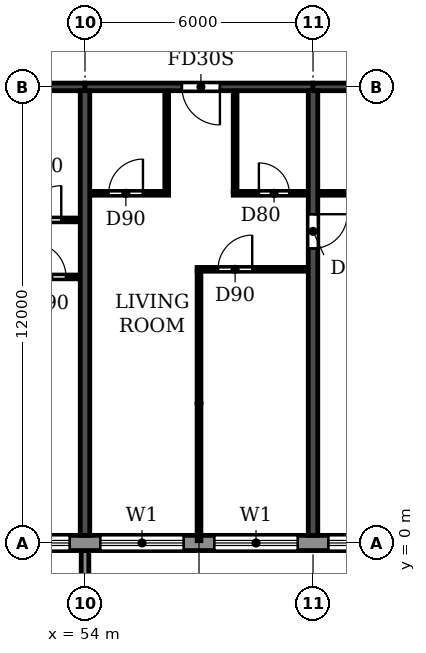
"""IFC4 building model, lengths in metres.
Left out: names, types, materials, properties, quantities, classifications, styles, units other than length and angle.
Written with IfcOpenShell. Run it as: python <this file> out.ifc"""

import sys

from ifc_helpers import new_model, si_unit, direction, frame, frame_2d, origin, place, context, subcontext, project, spatial, polyline, rectangle, outline, extrude, source, transform, mapped, element, fill, save


model = new_model("IFC4")
c1 = context("Model", 3, precision=1e-05, world=origin(), true_north=direction((0.0, 1.0)))
c2 = subcontext(c1, "Body", "Model", "MODEL_VIEW")
j1 = project(units=[si_unit("LENGTHUNIT", "METRE"), si_unit("PLANEANGLEUNIT", "RADIAN")], contexts=[c1])
p1 = place(None, origin())
s1 = spatial("IfcSite", under=j1, at=p1, CompositionType="ELEMENT")
p2 = place(p1, origin())
s2 = spatial("IfcBuilding", under=s1, at=p2, CompositionType="ELEMENT")
p3 = place(p2, frame((0.0, 0.0, 201.6)))
s3 = spatial("IfcBuildingStorey", under=s2, at=p3, CompositionType="ELEMENT", Elevation=201.6)
p4 = place(p3, frame((54.0, 0.2, 0.0), z_axis=(0.0, 0.0, 1.0), x_axis=(0.0, 1.0, 0.0)))
e1 = element("IfcWall", 1, at=p4, inside=s3, PredefinedType="SHEAR", context=c2, shape_type="SweptSolid", body=[
    extrude(rectangle(XDim=11.7, YDim=0.25, at=frame_2d((5.85, 0.0))), origin(), (0.0, 0.0, 1.0), 3.08),
])
p5 = place(p3, frame((60.0, 0.2, 0.0), z_axis=(0.0, 0.0, 1.0), x_axis=(0.0, 1.0, 0.0)))
e2 = element("IfcWall", 2, at=p5, inside=s3, PredefinedType="SHEAR", context=c2, shape_type="SweptSolid", body=[
    extrude(rectangle(XDim=11.7, YDim=0.25, at=frame_2d((5.85, 0.0))), origin(), (0.0, 0.0, 1.0), 3.08),
])
p6 = place(p5, frame((7.55, 0.0, 0.0)))
e3 = element("IfcOpeningElement", 3, at=p6, cuts=e2, PredefinedType="OPENING", context=c2, shape_type="SweptSolid", body=[
    extrude(rectangle(XDim=0.9, YDim=2.1, at=frame_2d((0.45, 1.05))), frame((0.0, 0.135, 0.0), z_axis=(0.0, -1.0, 0.0), x_axis=(1.0, 0.0, 0.0)), (0.0, 0.0, 1.0), 0.27),
])
p7 = place(p3, frame((48.0, 12.0, 0.0), z_axis=(0.0, 0.0, 1.0), x_axis=(1.0, 0.0, 0.0)))
e4 = element("IfcWall", 4, at=p7, inside=s3, PredefinedType="SHEAR", context=c2, shape_type="SweptSolid", body=[
    extrude(rectangle(XDim=6.0, YDim=0.2, at=frame_2d((3.0, 0.0))), origin(), (0.0, 0.0, 1.0), 2.48),
])
p8 = place(p7, frame((2.45, 0.0, 0.0)))
e5 = element("IfcOpeningElement", 5, at=p8, cuts=e4, PredefinedType="OPENING", context=c2, shape_type="SweptSolid", body=[
    extrude(rectangle(XDim=1.0, YDim=2.1, at=frame_2d((0.5, 1.05))), frame((0.0, 0.11, 0.0), z_axis=(0.0, -1.0, 0.0), x_axis=(1.0, 0.0, 0.0)), (0.0, 0.0, 1.0), 0.22),
])
p9 = place(p3, frame((54.0, 12.0, 0.0), z_axis=(0.0, 0.0, 1.0), x_axis=(1.0, 0.0, 0.0)))
e6 = element("IfcWall", 6, at=p9, inside=s3, PredefinedType="SHEAR", context=c2, shape_type="SweptSolid", body=[
    extrude(rectangle(XDim=6.0, YDim=0.2, at=frame_2d((3.0, 0.0))), origin(), (0.0, 0.0, 1.0), 2.48),
])
p10 = place(p9, frame((2.55, 0.0, 0.0)))
e7 = element("IfcOpeningElement", 7, at=p10, cuts=e6, PredefinedType="OPENING", context=c2, shape_type="SweptSolid", body=[
    extrude(rectangle(XDim=1.0, YDim=2.1, at=frame_2d((0.5, 1.05))), frame((0.0, 0.11, 0.0), z_axis=(0.0, -1.0, 0.0), x_axis=(1.0, 0.0, 0.0)), (0.0, 0.0, 1.0), 0.22),
])
p11 = place(p3, frame((60.0, 12.0, 0.0), z_axis=(0.0, 0.0, 1.0), x_axis=(1.0, 0.0, 0.0)))
e8 = element("IfcWall", 8, at=p11, inside=s3, PredefinedType="SHEAR", context=c2, shape_type="SweptSolid", body=[
    extrude(rectangle(XDim=6.0, YDim=0.2, at=frame_2d((3.0, 0.0))), origin(), (0.0, 0.0, 1.0), 2.48),
])
p12 = place(p3, frame((22.683, 0.0, 0.0), z_axis=(0.0, 0.0, 1.0), x_axis=(1.0, 0.0, 0.0)))
e9 = element("IfcWall", 9, at=p12, inside=s3, PredefinedType="STANDARD", context=c2, shape_type="SweptSolid", body=[
    extrude(rectangle(XDim=56.634, YDim=0.4, at=frame_2d((28.317, 0.0))), origin(), (0.0, 0.0, 1.0), 3.08),
])
p13 = place(p12, frame((1.917, 0.0, 0.0)))
e10 = element("IfcOpeningElement", 10, at=p13, cuts=e9, PredefinedType="OPENING", context=c2, shape_type="SweptSolid", body=[
    extrude(rectangle(XDim=1.8, YDim=2.4, at=frame_2d((0.9, 1.2))), frame((0.0, 0.21, 0.0), z_axis=(0.0, -1.0, 0.0), x_axis=(1.0, 0.0, 0.0)), (0.0, 0.0, 1.0), 0.42),
])
p14 = place(p12, frame((4.717, 0.0, 0.9)))
e11 = element("IfcOpeningElement", 11, at=p14, cuts=e9, PredefinedType="OPENING", context=c2, shape_type="SweptSolid", body=[
    extrude(rectangle(XDim=2.2, YDim=1.5, at=frame_2d((1.1, 0.75))), frame((0.0, 0.21, 0.0), z_axis=(0.0, -1.0, 0.0), x_axis=(1.0, 0.0, 0.0)), (0.0, 0.0, 1.0), 0.42),
])
p15 = place(p12, frame((7.717, 0.0, 0.9)))
e12 = element("IfcOpeningElement", 12, at=p15, cuts=e9, PredefinedType="OPENING", context=c2, shape_type="SweptSolid", body=[
    extrude(rectangle(XDim=2.2, YDim=1.5, at=frame_2d((1.1, 0.75))), frame((0.0, 0.21, 0.0), z_axis=(0.0, -1.0, 0.0), x_axis=(1.0, 0.0, 0.0)), (0.0, 0.0, 1.0), 0.42),
])
p16 = place(p12, frame((10.717, 0.0, 0.9)))
e13 = element("IfcOpeningElement", 13, at=p16, cuts=e9, PredefinedType="OPENING", context=c2, shape_type="SweptSolid", body=[
    extrude(rectangle(XDim=2.2, YDim=1.5, at=frame_2d((1.1, 0.75))), frame((0.0, 0.21, 0.0), z_axis=(0.0, -1.0, 0.0), x_axis=(1.0, 0.0, 0.0)), (0.0, 0.0, 1.0), 0.42),
])
p17 = place(p12, frame((13.917, 0.0, 0.0)))
e14 = element("IfcOpeningElement", 14, at=p17, cuts=e9, PredefinedType="OPENING", context=c2, shape_type="SweptSolid", body=[
    extrude(rectangle(XDim=1.8, YDim=2.4, at=frame_2d((0.9, 1.2))), frame((0.0, 0.21, 0.0), z_axis=(0.0, -1.0, 0.0), x_axis=(1.0, 0.0, 0.0)), (0.0, 0.0, 1.0), 0.42),
])
p18 = place(p12, frame((16.717, 0.0, 0.9)))
e15 = element("IfcOpeningElement", 15, at=p18, cuts=e9, PredefinedType="OPENING", context=c2, shape_type="SweptSolid", body=[
    extrude(rectangle(XDim=2.2, YDim=1.5, at=frame_2d((1.1, 0.75))), frame((0.0, 0.21, 0.0), z_axis=(0.0, -1.0, 0.0), x_axis=(1.0, 0.0, 0.0)), (0.0, 0.0, 1.0), 0.42),
])
p19 = place(p12, frame((19.717, 0.0, 0.9)))
e16 = element("IfcOpeningElement", 16, at=p19, cuts=e9, PredefinedType="OPENING", context=c2, shape_type="SweptSolid", body=[
    extrude(rectangle(XDim=2.2, YDim=1.5, at=frame_2d((1.1, 0.75))), frame((0.0, 0.21, 0.0), z_axis=(0.0, -1.0, 0.0), x_axis=(1.0, 0.0, 0.0)), (0.0, 0.0, 1.0), 0.42),
])
p20 = place(p12, frame((22.717, 0.0, 0.9)))
e17 = element("IfcOpeningElement", 17, at=p20, cuts=e9, PredefinedType="OPENING", context=c2, shape_type="SweptSolid", body=[
    extrude(rectangle(XDim=2.2, YDim=1.5, at=frame_2d((1.1, 0.75))), frame((0.0, 0.21, 0.0), z_axis=(0.0, -1.0, 0.0), x_axis=(1.0, 0.0, 0.0)), (0.0, 0.0, 1.0), 0.42),
])
p21 = place(p12, frame((25.917, 0.0, 0.0)))
e18 = element("IfcOpeningElement", 18, at=p21, cuts=e9, PredefinedType="OPENING", context=c2, shape_type="SweptSolid", body=[
    extrude(rectangle(XDim=1.8, YDim=2.4, at=frame_2d((0.9, 1.2))), frame((0.0, 0.21, 0.0), z_axis=(0.0, -1.0, 0.0), x_axis=(1.0, 0.0, 0.0)), (0.0, 0.0, 1.0), 0.42),
])
p22 = place(p12, frame((28.717, 0.0, 0.9)))
e19 = element("IfcOpeningElement", 19, at=p22, cuts=e9, PredefinedType="OPENING", context=c2, shape_type="SweptSolid", body=[
    extrude(rectangle(XDim=2.2, YDim=1.5, at=frame_2d((1.1, 0.75))), frame((0.0, 0.21, 0.0), z_axis=(0.0, -1.0, 0.0), x_axis=(1.0, 0.0, 0.0)), (0.0, 0.0, 1.0), 0.42),
])
p23 = place(p12, frame((31.717, 0.0, 0.9)))
e20 = element("IfcOpeningElement", 20, at=p23, cuts=e9, PredefinedType="OPENING", context=c2, shape_type="SweptSolid", body=[
    extrude(rectangle(XDim=2.2, YDim=1.5, at=frame_2d((1.1, 0.75))), frame((0.0, 0.21, 0.0), z_axis=(0.0, -1.0, 0.0), x_axis=(1.0, 0.0, 0.0)), (0.0, 0.0, 1.0), 0.42),
])
p24 = place(p12, frame((34.717, 0.0, 0.9)))
e21 = element("IfcOpeningElement", 21, at=p24, cuts=e9, PredefinedType="OPENING", context=c2, shape_type="SweptSolid", body=[
    extrude(rectangle(XDim=2.2, YDim=1.5, at=frame_2d((1.1, 0.75))), frame((0.0, 0.21, 0.0), z_axis=(0.0, -1.0, 0.0), x_axis=(1.0, 0.0, 0.0)), (0.0, 0.0, 1.0), 0.42),
])
p25 = place(p12, frame((37.717, 0.0, 0.9)))
e22 = element("IfcOpeningElement", 22, at=p25, cuts=e9, PredefinedType="OPENING", context=c2, shape_type="SweptSolid", body=[
    extrude(rectangle(XDim=2.2, YDim=1.5, at=frame_2d((1.1, 0.75))), frame((0.0, 0.21, 0.0), z_axis=(0.0, -1.0, 0.0), x_axis=(1.0, 0.0, 0.0)), (0.0, 0.0, 1.0), 0.42),
])
p26 = place(p12, frame((40.717, 0.0, 0.9)))
e23 = element("IfcOpeningElement", 23, at=p26, cuts=e9, PredefinedType="OPENING", context=c2, shape_type="SweptSolid", body=[
    extrude(rectangle(XDim=2.2, YDim=1.5, at=frame_2d((1.1, 0.75))), frame((0.0, 0.21, 0.0), z_axis=(0.0, -1.0, 0.0), x_axis=(1.0, 0.0, 0.0)), (0.0, 0.0, 1.0), 0.42),
])
p27 = place(p12, frame((43.717, 0.0, 0.9)))
e24 = element("IfcOpeningElement", 24, at=p27, cuts=e9, PredefinedType="OPENING", context=c2, shape_type="SweptSolid", body=[
    extrude(rectangle(XDim=2.2, YDim=1.5, at=frame_2d((1.1, 0.75))), frame((0.0, 0.21, 0.0), z_axis=(0.0, -1.0, 0.0), x_axis=(1.0, 0.0, 0.0)), (0.0, 0.0, 1.0), 0.42),
])
p28 = place(p12, frame((46.717, 0.0, 0.9)))
e25 = element("IfcOpeningElement", 25, at=p28, cuts=e9, PredefinedType="OPENING", context=c2, shape_type="SweptSolid", body=[
    extrude(rectangle(XDim=2.2, YDim=1.5, at=frame_2d((1.1, 0.75))), frame((0.0, 0.21, 0.0), z_axis=(0.0, -1.0, 0.0), x_axis=(1.0, 0.0, 0.0)), (0.0, 0.0, 1.0), 0.42),
])
p29 = place(p12, frame((49.717, 0.0, 0.9)))
e26 = element("IfcOpeningElement", 26, at=p29, cuts=e9, PredefinedType="OPENING", context=c2, shape_type="SweptSolid", body=[
    extrude(rectangle(XDim=2.2, YDim=1.5, at=frame_2d((1.1, 0.75))), frame((0.0, 0.21, 0.0), z_axis=(0.0, -1.0, 0.0), x_axis=(1.0, 0.0, 0.0)), (0.0, 0.0, 1.0), 0.42),
])
p30 = place(p12, frame((52.917, 0.0, 0.0)))
e27 = element("IfcOpeningElement", 27, at=p30, cuts=e9, PredefinedType="OPENING", context=c2, shape_type="SweptSolid", body=[
    extrude(rectangle(XDim=1.8, YDim=2.4, at=frame_2d((0.9, 1.2))), frame((0.0, 0.21, 0.0), z_axis=(0.0, -1.0, 0.0), x_axis=(1.0, 0.0, 0.0)), (0.0, 0.0, 1.0), 0.42),
])
m1 = source(origin(), c2, "Body", "SweptSolid", [
    extrude(outline(polyline([(0.0, 0.0), (0.2, 0.0), (0.2, 1.65), (0.0, 1.65), (0.0, 0.0)])), origin(), (0.0, 0.0, 1.0), 3.1),
])
p31 = place(p3, frame((53.9, -1.85, 0.0)))
e28 = element("IfcWall", 28, at=p31, inside=s3, PredefinedType="STANDARD", context=c2, shape_type="MappedRepresentation", body=[
    mapped(m1, transform((0.0, 0.0, 0.0))),
])
p32 = place(p3, frame((50.95, 7.0, 0.0), z_axis=(0.0, 0.0, 1.0), x_axis=(1.0, 0.0, 0.0)))
e29 = element("IfcWall", 29, at=p32, inside=s3, PredefinedType="PARTITIONING", context=c2, shape_type="SweptSolid", body=[
    extrude(rectangle(XDim=2.915, YDim=0.1, at=frame_2d((1.458, 0.0))), origin(), (0.0, 0.0, 1.0), 3.08),
])
p33 = place(p32, frame((1.65, 0.0, 0.0)))
e30 = element("IfcOpeningElement", 30, at=p33, cuts=e29, PredefinedType="OPENING", context=c2, shape_type="SweptSolid", body=[
    extrude(rectangle(XDim=0.9, YDim=2.1, at=frame_2d((0.45, 1.05))), frame((0.0, 0.06, 0.0), z_axis=(0.0, -1.0, 0.0), x_axis=(1.0, 0.0, 0.0)), (0.0, 0.0, 1.0), 0.12),
])
p34 = place(p3, frame((56.95, 7.2, 0.0), z_axis=(0.0, 0.0, 1.0), x_axis=(1.0, 0.0, 0.0)))
e31 = element("IfcWall", 31, at=p34, inside=s3, PredefinedType="PARTITIONING", context=c2, shape_type="SweptSolid", body=[
    extrude(rectangle(XDim=2.915, YDim=0.1, at=frame_2d((1.458, 0.0))), origin(), (0.0, 0.0, 1.0), 3.08),
])
p35 = place(p34, frame((0.55, 0.0, 0.0)))
e32 = element("IfcOpeningElement", 32, at=p35, cuts=e31, PredefinedType="OPENING", context=c2, shape_type="SweptSolid", body=[
    extrude(rectangle(XDim=0.9, YDim=2.1, at=frame_2d((0.45, 1.05))), frame((0.0, 0.06, 0.0), z_axis=(0.0, -1.0, 0.0), x_axis=(1.0, 0.0, 0.0)), (0.0, 0.0, 1.0), 0.12),
])
p36 = place(p3, frame((51.8, 8.5, 0.0), z_axis=(0.0, 0.0, 1.0), x_axis=(1.0, 0.0, 0.0)))
e33 = element("IfcWall", 33, at=p36, inside=s3, PredefinedType="PARTITIONING", context=c2, shape_type="SweptSolid", body=[
    extrude(rectangle(XDim=2.065, YDim=0.1, at=frame_2d((1.032, 0.0))), origin(), (0.0, 0.0, 1.0), 3.08),
])
p37 = place(p36, frame((0.675, 0.0, 0.0)))
e34 = element("IfcOpeningElement", 34, at=p37, cuts=e33, PredefinedType="OPENING", context=c2, shape_type="SweptSolid", body=[
    extrude(rectangle(XDim=0.9, YDim=2.1, at=frame_2d((0.45, 1.05))), frame((0.0, 0.06, 0.0), z_axis=(0.0, -1.0, 0.0), x_axis=(1.0, 0.0, 0.0)), (0.0, 0.0, 1.0), 0.12),
])
p38 = place(p3, frame((54.135, 9.2, 0.0), z_axis=(0.0, 0.0, 1.0), x_axis=(1.0, 0.0, 0.0)))
e35 = element("IfcWall", 35, at=p38, inside=s3, PredefinedType="PARTITIONING", context=c2, shape_type="SweptSolid", body=[
    extrude(rectangle(XDim=2.065, YDim=0.1, at=frame_2d((1.032, 0.0))), origin(), (0.0, 0.0, 1.0), 3.08),
])
p39 = place(p38, frame((0.49, 0.0, 0.0)))
e36 = element("IfcOpeningElement", 36, at=p39, cuts=e35, PredefinedType="OPENING", context=c2, shape_type="SweptSolid", body=[
    extrude(rectangle(XDim=0.9, YDim=2.1, at=frame_2d((0.45, 1.05))), frame((0.0, 0.06, 0.0), z_axis=(0.0, -1.0, 0.0), x_axis=(1.0, 0.0, 0.0)), (0.0, 0.0, 1.0), 0.12),
])
p40 = place(p3, frame((57.9, 9.2, 0.0), z_axis=(0.0, 0.0, 1.0), x_axis=(1.0, 0.0, 0.0)))
e37 = element("IfcWall", 37, at=p40, inside=s3, PredefinedType="PARTITIONING", context=c2, shape_type="SweptSolid", body=[
    extrude(rectangle(XDim=1.965, YDim=0.1, at=frame_2d((0.982, 0.0))), origin(), (0.0, 0.0, 1.0), 3.08),
])
p41 = place(p40, frame((0.675, 0.0, 0.0)))
e38 = element("IfcOpeningElement", 38, at=p41, cuts=e37, PredefinedType="OPENING", context=c2, shape_type="SweptSolid", body=[
    extrude(rectangle(XDim=0.8, YDim=2.1, at=frame_2d((0.4, 1.05))), frame((0.0, 0.06, 0.0), z_axis=(0.0, -1.0, 0.0), x_axis=(1.0, 0.0, 0.0)), (0.0, 0.0, 1.0), 0.12),
])
p42 = place(p3, frame((60.135, 9.2, 0.0), z_axis=(0.0, 0.0, 1.0), x_axis=(1.0, 0.0, 0.0)))
e39 = element("IfcWall", 39, at=p42, inside=s3, PredefinedType="PARTITIONING", context=c2, shape_type="SweptSolid", body=[
    extrude(rectangle(XDim=2.765, YDim=0.1, at=frame_2d((1.382, 0.0))), origin(), (0.0, 0.0, 1.0), 3.08),
])
p43 = place(p42, frame((0.965, 0.0, 0.0)))
e40 = element("IfcOpeningElement", 40, at=p43, cuts=e39, PredefinedType="OPENING", context=c2, shape_type="SweptSolid", body=[
    extrude(rectangle(XDim=0.8, YDim=2.1, at=frame_2d((0.4, 1.05))), frame((0.0, 0.06, 0.0), z_axis=(0.0, -1.0, 0.0), x_axis=(1.0, 0.0, 0.0)), (0.0, 0.0, 1.0), 0.12),
])
p44 = place(p3, frame((56.15, 9.25, 0.0), z_axis=(0.0, 0.0, 1.0), x_axis=(0.0, 1.0, 0.0)))
e41 = element("IfcWall", 41, at=p44, inside=s3, PredefinedType="PARTITIONING", context=c2, shape_type="SweptSolid", body=[
    extrude(rectangle(XDim=2.64, YDim=0.1, at=frame_2d((1.32, 0.0))), origin(), (0.0, 0.0, 1.0), 3.08),
])
p45 = place(p3, frame((57.0, 0.06, 0.0), z_axis=(0.0, 0.0, 1.0), x_axis=(0.0, 1.0, 0.0)))
e42 = element("IfcWall", 42, at=p45, inside=s3, PredefinedType="PARTITIONING", context=c2, shape_type="SweptSolid", body=[
    extrude(rectangle(XDim=7.09, YDim=0.1, at=frame_2d((3.545, 0.0))), origin(), (0.0, 0.0, 1.0), 3.08),
])
p46 = place(p3, frame((57.95, 9.25, 0.0), z_axis=(0.0, 0.0, 1.0), x_axis=(0.0, 1.0, 0.0)))
e43 = element("IfcWall", 43, at=p46, inside=s3, PredefinedType="PARTITIONING", context=c2, shape_type="SweptSolid", body=[
    extrude(rectangle(XDim=2.64, YDim=0.1, at=frame_2d((1.32, 0.0))), origin(), (0.0, 0.0, 1.0), 3.08),
])
p47 = place(p22, origin())
e44 = element("IfcWindow", 44, at=p47, inside=s3, PartitioningType="DOUBLE_PANEL_HORIZONTAL", PredefinedType="WINDOW", context=c2, shape_type="SweptSolid", body=[
    extrude(rectangle(XDim=2.2, YDim=1.5, at=frame_2d((1.1, 0.75))), frame((0.0, 0.03, 0.0), z_axis=(0.0, -1.0, 0.0), x_axis=(1.0, 0.0, 0.0)), (0.0, 0.0, 1.0), 0.06),
])
fill(e19, e44)
p48 = place(p23, origin())
e45 = element("IfcWindow", 45, at=p48, inside=s3, PartitioningType="DOUBLE_PANEL_HORIZONTAL", PredefinedType="WINDOW", context=c2, shape_type="SweptSolid", body=[
    extrude(rectangle(XDim=2.2, YDim=1.5, at=frame_2d((1.1, 0.75))), frame((0.0, 0.03, 0.0), z_axis=(0.0, -1.0, 0.0), x_axis=(1.0, 0.0, 0.0)), (0.0, 0.0, 1.0), 0.06),
])
fill(e20, e45)
p49 = place(p24, origin())
e46 = element("IfcWindow", 46, at=p49, inside=s3, PartitioningType="DOUBLE_PANEL_HORIZONTAL", PredefinedType="WINDOW", context=c2, shape_type="SweptSolid", body=[
    extrude(rectangle(XDim=2.2, YDim=1.5, at=frame_2d((1.1, 0.75))), frame((0.0, 0.03, 0.0), z_axis=(0.0, -1.0, 0.0), x_axis=(1.0, 0.0, 0.0)), (0.0, 0.0, 1.0), 0.06),
])
fill(e21, e46)
p50 = place(p25, origin())
e47 = element("IfcWindow", 47, at=p50, inside=s3, PartitioningType="DOUBLE_PANEL_HORIZONTAL", PredefinedType="WINDOW", context=c2, shape_type="SweptSolid", body=[
    extrude(rectangle(XDim=2.2, YDim=1.5, at=frame_2d((1.1, 0.75))), frame((0.0, 0.03, 0.0), z_axis=(0.0, -1.0, 0.0), x_axis=(1.0, 0.0, 0.0)), (0.0, 0.0, 1.0), 0.06),
])
fill(e22, e47)
p51 = place(p37, origin())
e48 = element("IfcDoor", 48, at=p51, inside=s3, OperationType="SINGLE_SWING_RIGHT", PredefinedType="DOOR", context=c2, shape_type="SweptSolid", body=[
    extrude(rectangle(XDim=0.9, YDim=2.1, at=frame_2d((0.45, 1.05))), frame((0.0, 0.025, 0.0), z_axis=(0.0, -1.0, 0.0), x_axis=(1.0, 0.0, 0.0)), (0.0, 0.0, 1.0), 0.05),
])
fill(e34, e48)
p52 = place(p33, origin())
e49 = element("IfcDoor", 49, at=p52, inside=s3, OperationType="SINGLE_SWING_LEFT", PredefinedType="DOOR", context=c2, shape_type="SweptSolid", body=[
    extrude(rectangle(XDim=0.9, YDim=2.1, at=frame_2d((0.45, 1.05))), frame((0.0, 0.025, 0.0), z_axis=(0.0, -1.0, 0.0), x_axis=(1.0, 0.0, 0.0)), (0.0, 0.0, 1.0), 0.05),
])
fill(e30, e49)
p53 = place(p39, origin())
e50 = element("IfcDoor", 50, at=p53, inside=s3, OperationType="SINGLE_SWING_RIGHT", PredefinedType="DOOR", context=c2, shape_type="SweptSolid", body=[
    extrude(rectangle(XDim=0.9, YDim=2.1, at=frame_2d((0.45, 1.05))), frame((0.0, 0.025, 0.0), z_axis=(0.0, -1.0, 0.0), x_axis=(1.0, 0.0, 0.0)), (0.0, 0.0, 1.0), 0.05),
])
fill(e36, e50)
p54 = place(p10, frame((1.0, 0.0, 0.0), z_axis=(0.0, 0.0, 1.0), x_axis=(-1.0, 0.0, 0.0)))
e51 = element("IfcDoor", 51, at=p54, inside=s3, OperationType="SINGLE_SWING_LEFT", PredefinedType="DOOR", context=c2, shape_type="SweptSolid", body=[
    extrude(rectangle(XDim=1.0, YDim=2.1, at=frame_2d((0.5, 1.05))), frame((0.0, 0.025, 0.0), z_axis=(0.0, -1.0, 0.0), x_axis=(1.0, 0.0, 0.0)), (0.0, 0.0, 1.0), 0.05),
])
fill(e7, e51)
p55 = place(p35, origin())
e52 = element("IfcDoor", 52, at=p55, inside=s3, OperationType="SINGLE_SWING_RIGHT", PredefinedType="DOOR", context=c2, shape_type="SweptSolid", body=[
    extrude(rectangle(XDim=0.9, YDim=2.1, at=frame_2d((0.45, 1.05))), frame((0.0, 0.025, 0.0), z_axis=(0.0, -1.0, 0.0), x_axis=(1.0, 0.0, 0.0)), (0.0, 0.0, 1.0), 0.05),
])
fill(e32, e52)
p56 = place(p41, origin())
e53 = element("IfcDoor", 53, at=p56, inside=s3, OperationType="SINGLE_SWING_LEFT", PredefinedType="DOOR", context=c2, shape_type="SweptSolid", body=[
    extrude(rectangle(XDim=0.8, YDim=2.1, at=frame_2d((0.4, 1.05))), frame((0.0, 0.025, 0.0), z_axis=(0.0, -1.0, 0.0), x_axis=(1.0, 0.0, 0.0)), (0.0, 0.0, 1.0), 0.05),
])
fill(e38, e53)
p57 = place(p6, frame((0.9, 0.0, 0.0), z_axis=(0.0, 0.0, 1.0), x_axis=(-1.0, 0.0, 0.0)))
e54 = element("IfcDoor", 54, at=p57, inside=s3, OperationType="SINGLE_SWING_LEFT", PredefinedType="DOOR", context=c2, shape_type="SweptSolid", body=[
    extrude(rectangle(XDim=0.9, YDim=2.1, at=frame_2d((0.45, 1.05))), frame((0.0, 0.025, 0.0), z_axis=(0.0, -1.0, 0.0), x_axis=(1.0, 0.0, 0.0)), (0.0, 0.0, 1.0), 0.05),
])
fill(e3, e54)
save(model, sys.argv[1])
